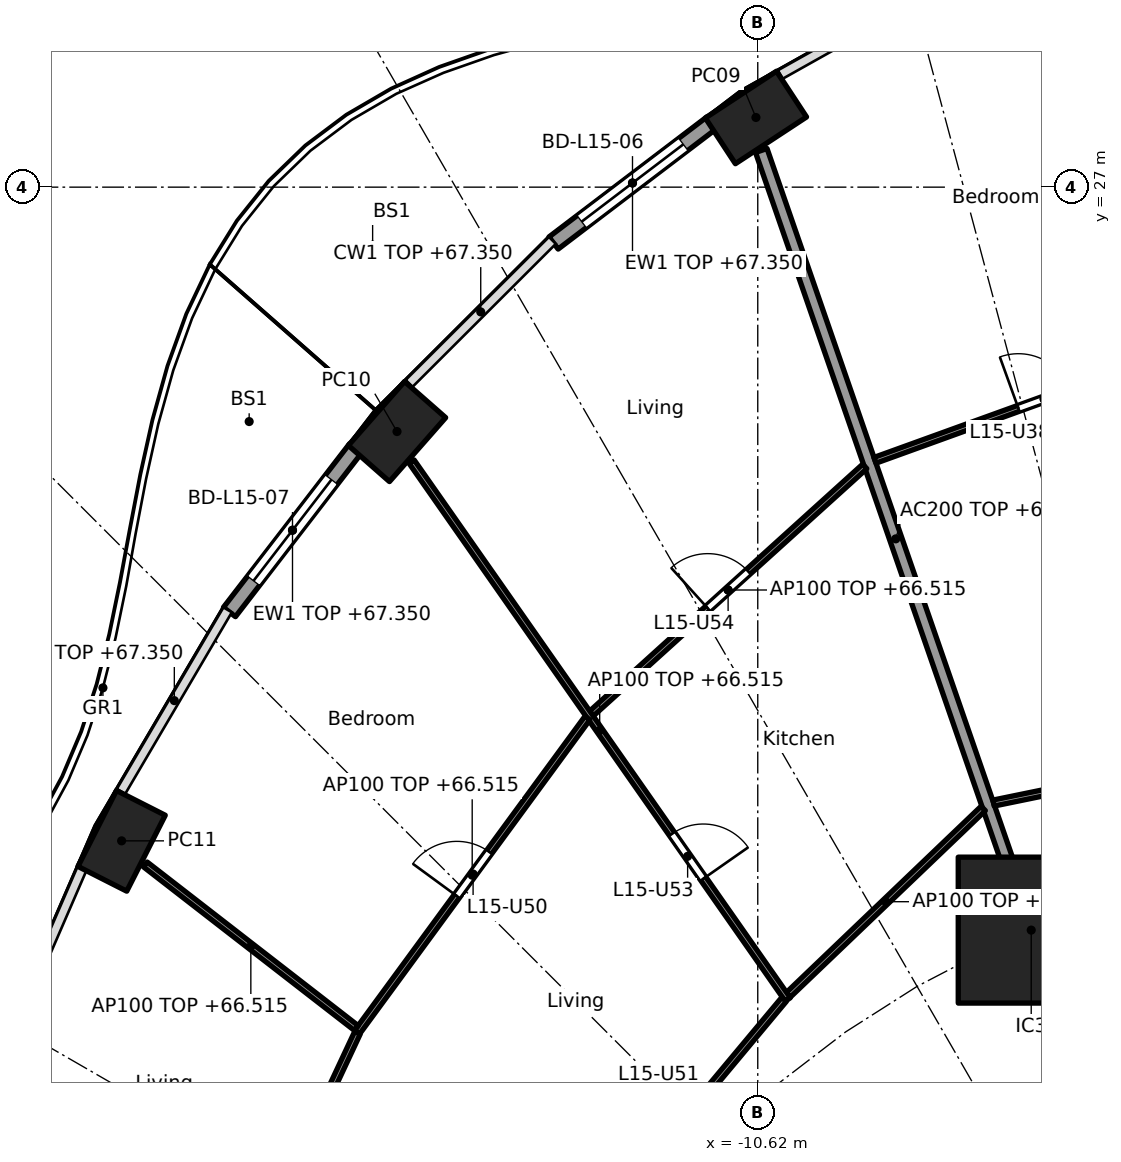
"""IFC4 building model, lengths in metres.
Left out: names, types, materials, properties, quantities, classifications, styles, units other than length and angle.
Written with IfcOpenShell. Run it as: python <this file> out.ifc"""

import sys

from ifc_helpers import new_model, si_unit, direction, frame, frame_2d, origin, origin_2d, place, context, subcontext, project, spatial, rectangle, hollow_rectangle, extrude, element, fill, save


model = new_model("IFC4")
c1 = context("Model", 3, precision=1e-05, world=origin(), true_north=direction((0.0, 1.0)))
c2 = subcontext(c1, "Body", "Model", "MODEL_VIEW")
j1 = project(units=[si_unit("LENGTHUNIT", "METRE"), si_unit("PLANEANGLEUNIT", "RADIAN")], contexts=[c1])
p1 = place(None, origin())
s1 = spatial("IfcSite", under=j1, at=p1, CompositionType="ELEMENT")
p2 = place(p1, origin())
s2 = spatial("IfcBuilding", under=s1, at=p2, CompositionType="ELEMENT")
p3 = place(p2, frame((0.0, 0.0, 64.0)))
s3 = spatial("IfcBuildingStorey", under=s2, at=p3, CompositionType="ELEMENT", Elevation=64.0)
for number, where, z_axis, x_axis in (
    (1, (-10.65, 28.146, 0.0), (0.0, 0.0, 1.0), (-0.836, -0.549, 0.0)),
    (2, (-16.552, 22.981, 0.0), (0.0, 0.0, 1.0), (-0.66, -0.751, 0.0)),
    (3, (-21.082, 16.25, 0.0), (0.0, 0.0, 1.0), (-0.452, -0.892, 0.0)),
):
    element("IfcColumn", number, at=place(p3, frame(where, z_axis=z_axis, x_axis=x_axis)), inside=s3, PredefinedType="COLUMN", context=c2, shape_type="SweptSolid", body=[
        extrude(hollow_rectangle(XDim=1.4, YDim=0.9, WallThickness=0.05, at=origin_2d()), origin(), (0.0, 0.0, 1.0), 3.7),
    ])
p4 = place(p3, frame((-6.123, 14.782, 0.0), z_axis=(0.0, 0.0, 1.0), x_axis=(1.0, 0.0, 0.0)))
e4 = element("IfcColumn", 4, at=p4, inside=s3, PredefinedType="COLUMN", context=c2, shape_type="SweptSolid", body=[
    extrude(rectangle(XDim=2.4, YDim=2.4, at=origin_2d()), origin(), (0.0, 0.0, 1.0), 3.7),
])
p5 = place(p3, frame((-13.979, 26.081, 0.0), z_axis=(0.0, 0.0, 1.0), x_axis=(0.796022293214, 0.605267303517, 0.0)))
e5 = element("IfcWall", 5, at=p5, inside=s3, PredefinedType="SOLIDWALL", context=c2, shape_type="SweptSolid", body=[
    extrude(rectangle(XDim=3.262, YDim=0.25, at=frame_2d((1.631, 0.0))), origin(), (0.0, 0.0, 1.0), 3.35),
])
p6 = place(p5, frame((0.581, 0.0, 0.0)))
e6 = element("IfcOpeningElement", 6, at=p6, cuts=e5, PredefinedType="OPENING", context=c2, shape_type="SweptSolid", body=[
    extrude(rectangle(XDim=2.1, YDim=2.4, at=frame_2d((1.05, 1.2))), frame((0.0, 0.135, 0.0), z_axis=(0.0, -1.0, 0.0), x_axis=(1.0, 0.0, 0.0)), (0.0, 0.0, 1.0), 0.27),
])
p7 = place(p3, frame((-19.308, 20.013, 0.0), z_axis=(0.0, 0.0, 1.0), x_axis=(0.610457147657, 0.792049285635, 0.0)))
e7 = element("IfcWall", 7, at=p7, inside=s3, PredefinedType="SOLIDWALL", context=c2, shape_type="SweptSolid", body=[
    extrude(rectangle(XDim=3.397, YDim=0.25, at=frame_2d((1.699, 0.0))), origin(), (0.0, 0.0, 1.0), 3.35),
])
p8 = place(p7, frame((0.649, 0.0, 0.0)))
e8 = element("IfcOpeningElement", 8, at=p8, cuts=e7, PredefinedType="OPENING", context=c2, shape_type="SweptSolid", body=[
    extrude(rectangle(XDim=2.1, YDim=2.4, at=frame_2d((1.05, 1.2))), frame((0.0, 0.135, 0.0), z_axis=(0.0, -1.0, 0.0), x_axis=(1.0, 0.0, 0.0)), (0.0, 0.0, 1.0), 0.27),
])
p9 = place(p3, frame((-5.243, 12.657, 0.0), z_axis=(0.0, 0.0, 1.0), x_axis=(-0.382668627144, 0.923885664896, 0.0)))
e9 = element("IfcWall", 9, at=p9, inside=s3, PredefinedType="PARTITIONING", context=c2, shape_type="SweptSolid", body=[
    extrude(rectangle(XDim=2.2, YDim=0.2, at=frame_2d((1.1, 0.0))), origin(), (0.0, 0.0, 1.0), 3.35),
])
p10 = place(p3, frame((-6.139, 14.829, 0.0), z_axis=(0.0, 0.0, 1.0), x_axis=(-0.327178799566, 0.944962450637, 0.0)))
e10 = element("IfcWall", 10, at=p10, inside=s3, PredefinedType="PARTITIONING", context=c2, shape_type="SweptSolid", body=[
    extrude(rectangle(XDim=13.517, YDim=0.2, at=frame_2d((6.759, 0.0))), origin(), (0.0, 0.0, 1.0), 2.515),
])
p11 = place(p3, frame((-5.275, 12.494, 0.0), z_axis=(0.0, 0.0, 1.0), x_axis=(-0.707106781187, -0.707106781187, 0.0)))
e11 = element("IfcWall", 11, at=p11, inside=s3, PredefinedType="PARTITIONING", context=c2, shape_type="SweptSolid", body=[
    extrude(rectangle(XDim=10.209, YDim=0.2, at=frame_2d((5.104, 0.0))), origin(), (0.0, 0.0, 1.0), 3.35),
])
p12 = place(p3, frame((-2.272, 17.789, 0.0), z_axis=(0.0, 0.0, 1.0), x_axis=(-0.979595137747, -0.200981009307, 0.0)))
e12 = element("IfcWall", 12, at=p12, inside=s3, PredefinedType="PARTITIONING", context=c2, shape_type="SweptSolid", body=[
    extrude(rectangle(XDim=4.562, YDim=0.1, at=frame_2d((2.281, 0.0))), origin(), (0.0, 0.0, 1.0), 2.515),
])
p13 = place(p12, frame((1.856, 0.0, 0.0)))
e13 = element("IfcOpeningElement", 13, at=p13, cuts=e12, PredefinedType="OPENING", context=c2, shape_type="SweptSolid", body=[
    extrude(rectangle(XDim=0.9, YDim=2.1, at=frame_2d((0.45, 1.05))), frame((0.0, 0.06, 0.0), z_axis=(0.0, -1.0, 0.0), x_axis=(1.0, 0.0, 0.0)), (0.0, 0.0, 1.0), 0.12),
])
p14 = place(p3, frame((-3.128, 24.521, 0.0), z_axis=(0.0, 0.0, 1.0), x_axis=(-0.940401494588, -0.340066212636, 0.0)))
e14 = element("IfcWall", 14, at=p14, inside=s3, PredefinedType="PARTITIONING", context=c2, shape_type="SweptSolid", body=[
    extrude(rectangle(XDim=5.917, YDim=0.1, at=frame_2d((2.958, 0.0))), origin(), (0.0, 0.0, 1.0), 2.515),
])
p15 = place(p14, frame((2.509, 0.0, 0.0)))
e15 = element("IfcOpeningElement", 15, at=p15, cuts=e14, PredefinedType="OPENING", context=c2, shape_type="SweptSolid", body=[
    extrude(rectangle(XDim=0.9, YDim=2.1, at=frame_2d((0.45, 1.05))), frame((0.0, 0.06, 0.0), z_axis=(0.0, -1.0, 0.0), x_axis=(1.0, 0.0, 0.0)), (0.0, 0.0, 1.0), 0.12),
])
p16 = place(p3, frame((-6.912, 16.782, 0.0), z_axis=(0.0, 0.0, 1.0), x_axis=(-0.722775679202, -0.691082713975, 0.0)))
e16 = element("IfcWall", 16, at=p16, inside=s3, PredefinedType="PARTITIONING", context=c2, shape_type="SweptSolid", body=[
    extrude(rectangle(XDim=4.437, YDim=0.1, at=frame_2d((2.219, 0.0))), origin(), (0.0, 0.0, 1.0), 2.515),
])
p17 = place(p3, frame((-8.861, 22.407, 0.0), z_axis=(0.0, 0.0, 1.0), x_axis=(-0.741713303551, -0.670717060567, 0.0)))
e17 = element("IfcWall", 17, at=p17, inside=s3, PredefinedType="PARTITIONING", context=c2, shape_type="SweptSolid", body=[
    extrude(rectangle(XDim=6.059, YDim=0.1, at=frame_2d((3.03, 0.0))), origin(), (0.0, 0.0, 1.0), 2.515),
])
p18 = place(p17, frame((2.58, 0.0, 0.0)))
e18 = element("IfcOpeningElement", 18, at=p18, cuts=e17, PredefinedType="OPENING", context=c2, shape_type="SweptSolid", body=[
    extrude(rectangle(XDim=0.9, YDim=2.1, at=frame_2d((0.45, 1.05))), frame((0.0, 0.06, 0.0), z_axis=(0.0, -1.0, 0.0), x_axis=(1.0, 0.0, 0.0)), (0.0, 0.0, 1.0), 0.12),
])
p19 = place(p3, frame((-10.126, 13.641, 0.0), z_axis=(0.0, 0.0, 1.0), x_axis=(-0.57313289907, 0.819462433552, 0.0)))
e19 = element("IfcWall", 19, at=p19, inside=s3, PredefinedType="PARTITIONING", context=c2, shape_type="SweptSolid", body=[
    extrude(rectangle(XDim=10.794, YDim=0.1, at=frame_2d((5.397, 0.0))), origin(), (0.0, 0.0, 1.0), 2.515),
])
p20 = place(p19, frame((2.424, 0.0, 0.0)))
e20 = element("IfcOpeningElement", 20, at=p20, cuts=e19, PredefinedType="OPENING", context=c2, shape_type="SweptSolid", body=[
    extrude(rectangle(XDim=0.9, YDim=2.1, at=frame_2d((0.45, 1.05))), frame((0.0, 0.06, 0.0), z_axis=(0.0, -1.0, 0.0), x_axis=(1.0, 0.0, 0.0)), (0.0, 0.0, 1.0), 0.12),
])
p21 = place(p3, frame((-10.187, 13.643, 0.0), z_axis=(0.0, 0.0, 1.0), x_axis=(-0.640807748916, -0.767701393075, 0.0)))
e21 = element("IfcWall", 21, at=p21, inside=s3, PredefinedType="PARTITIONING", context=c2, shape_type="SweptSolid", body=[
    extrude(rectangle(XDim=4.737, YDim=0.1, at=frame_2d((2.368, 0.0))), origin(), (0.0, 0.0, 1.0), 2.515),
])
p22 = place(p21, frame((1.893, 0.0, 0.0)))
e22 = element("IfcOpeningElement", 22, at=p22, cuts=e21, PredefinedType="OPENING", context=c2, shape_type="SweptSolid", body=[
    extrude(rectangle(XDim=0.9, YDim=2.1, at=frame_2d((0.45, 1.05))), frame((0.0, 0.06, 0.0), z_axis=(0.0, -1.0, 0.0), x_axis=(1.0, 0.0, 0.0)), (0.0, 0.0, 1.0), 0.12),
])
p23 = place(p3, frame((-13.421, 18.269, 0.0), z_axis=(0.0, 0.0, 1.0), x_axis=(-0.591206785834, -0.806520016109, 0.0)))
e23 = element("IfcWall", 23, at=p23, inside=s3, PredefinedType="PARTITIONING", context=c2, shape_type="SweptSolid", body=[
    extrude(rectangle(XDim=6.41, YDim=0.1, at=frame_2d((3.205, 0.0))), origin(), (0.0, 0.0, 1.0), 2.515),
])
p24 = place(p23, frame((2.73, 0.0, 0.0)))
e24 = element("IfcOpeningElement", 24, at=p24, cuts=e23, PredefinedType="OPENING", context=c2, shape_type="SweptSolid", body=[
    extrude(rectangle(XDim=0.9, YDim=2.1, at=frame_2d((0.45, 1.05))), frame((0.0, 0.06, 0.0), z_axis=(0.0, -1.0, 0.0), x_axis=(1.0, 0.0, 0.0)), (0.0, 0.0, 1.0), 0.12),
])
p25 = place(p3, frame((-17.221, 13.171, 0.0), z_axis=(0.0, 0.0, 1.0), x_axis=(-0.790258254068, 0.612773932113, 0.0)))
e25 = element("IfcWall", 25, at=p25, inside=s3, PredefinedType="PARTITIONING", context=c2, shape_type="SweptSolid", body=[
    extrude(rectangle(XDim=4.392, YDim=0.1, at=frame_2d((2.196, 0.0))), origin(), (0.0, 0.0, 1.0), 2.515),
])
p26 = place(p3, frame((-17.203, 13.095, 0.0), z_axis=(0.0, 0.0, 1.0), x_axis=(-0.423892287987, -0.905712607942, 0.0)))
e26 = element("IfcWall", 26, at=p26, inside=s3, PredefinedType="PARTITIONING", context=c2, shape_type="SweptSolid", body=[
    extrude(rectangle(XDim=6.238, YDim=0.1, at=frame_2d((3.119, 0.0))), origin(), (0.0, 0.0, 1.0), 2.515),
])
p27 = place(p6, origin())
e27 = element("IfcDoor", 27, at=p27, inside=s3, OperationType="SLIDING_TO_LEFT", PredefinedType="DOOR", context=c2, shape_type="SweptSolid", body=[
    extrude(rectangle(XDim=2.1, YDim=2.4, at=frame_2d((1.05, 1.2))), frame((0.0, 0.025, 0.0), z_axis=(0.0, -1.0, 0.0), x_axis=(1.0, 0.0, 0.0)), (0.0, 0.0, 1.0), 0.05),
])
fill(e6, e27)
p28 = place(p8, origin())
e28 = element("IfcDoor", 28, at=p28, inside=s3, OperationType="SLIDING_TO_LEFT", PredefinedType="DOOR", context=c2, shape_type="SweptSolid", body=[
    extrude(rectangle(XDim=2.1, YDim=2.4, at=frame_2d((1.05, 1.2))), frame((0.0, 0.025, 0.0), z_axis=(0.0, -1.0, 0.0), x_axis=(1.0, 0.0, 0.0)), (0.0, 0.0, 1.0), 0.05),
])
fill(e8, e28)
p29 = place(p15, frame((0.9, 0.0, 0.0), x_axis=(-1.0, 0.0, 0.0)))
e29 = element("IfcDoor", 29, at=p29, inside=s3, OperationType="SINGLE_SWING_LEFT", PredefinedType="DOOR", context=c2, shape_type="SweptSolid", body=[
    extrude(rectangle(XDim=0.9, YDim=2.1, at=frame_2d((0.45, 1.05))), frame((0.0, 0.025, 0.0), z_axis=(0.0, -1.0, 0.0), x_axis=(1.0, 0.0, 0.0)), (0.0, 0.0, 1.0), 0.05),
])
fill(e15, e29)
p30 = place(p24, frame((0.9, 0.0, 0.0), x_axis=(-1.0, 0.0, 0.0)))
e30 = element("IfcDoor", 30, at=p30, inside=s3, OperationType="SINGLE_SWING_LEFT", PredefinedType="DOOR", context=c2, shape_type="SweptSolid", body=[
    extrude(rectangle(XDim=0.9, YDim=2.1, at=frame_2d((0.45, 1.05))), frame((0.0, 0.025, 0.0), z_axis=(0.0, -1.0, 0.0), x_axis=(1.0, 0.0, 0.0)), (0.0, 0.0, 1.0), 0.05),
])
fill(e24, e30)
p31 = place(p20, frame((0.9, 0.0, 0.0), x_axis=(-1.0, 0.0, 0.0)))
e31 = element("IfcDoor", 31, at=p31, inside=s3, OperationType="SINGLE_SWING_RIGHT", PredefinedType="DOOR", context=c2, shape_type="SweptSolid", body=[
    extrude(rectangle(XDim=0.9, YDim=2.1, at=frame_2d((0.45, 1.05))), frame((0.0, 0.025, 0.0), z_axis=(0.0, -1.0, 0.0), x_axis=(1.0, 0.0, 0.0)), (0.0, 0.0, 1.0), 0.05),
])
fill(e20, e31)
p32 = place(p18, frame((0.9, 0.0, 0.0), x_axis=(-1.0, 0.0, 0.0)))
e32 = element("IfcDoor", 32, at=p32, inside=s3, OperationType="SINGLE_SWING_LEFT", PredefinedType="DOOR", context=c2, shape_type="SweptSolid", body=[
    extrude(rectangle(XDim=0.9, YDim=2.1, at=frame_2d((0.45, 1.05))), frame((0.0, 0.025, 0.0), z_axis=(0.0, -1.0, 0.0), x_axis=(1.0, 0.0, 0.0)), (0.0, 0.0, 1.0), 0.05),
])
fill(e18, e32)
save(model, sys.argv[1])
